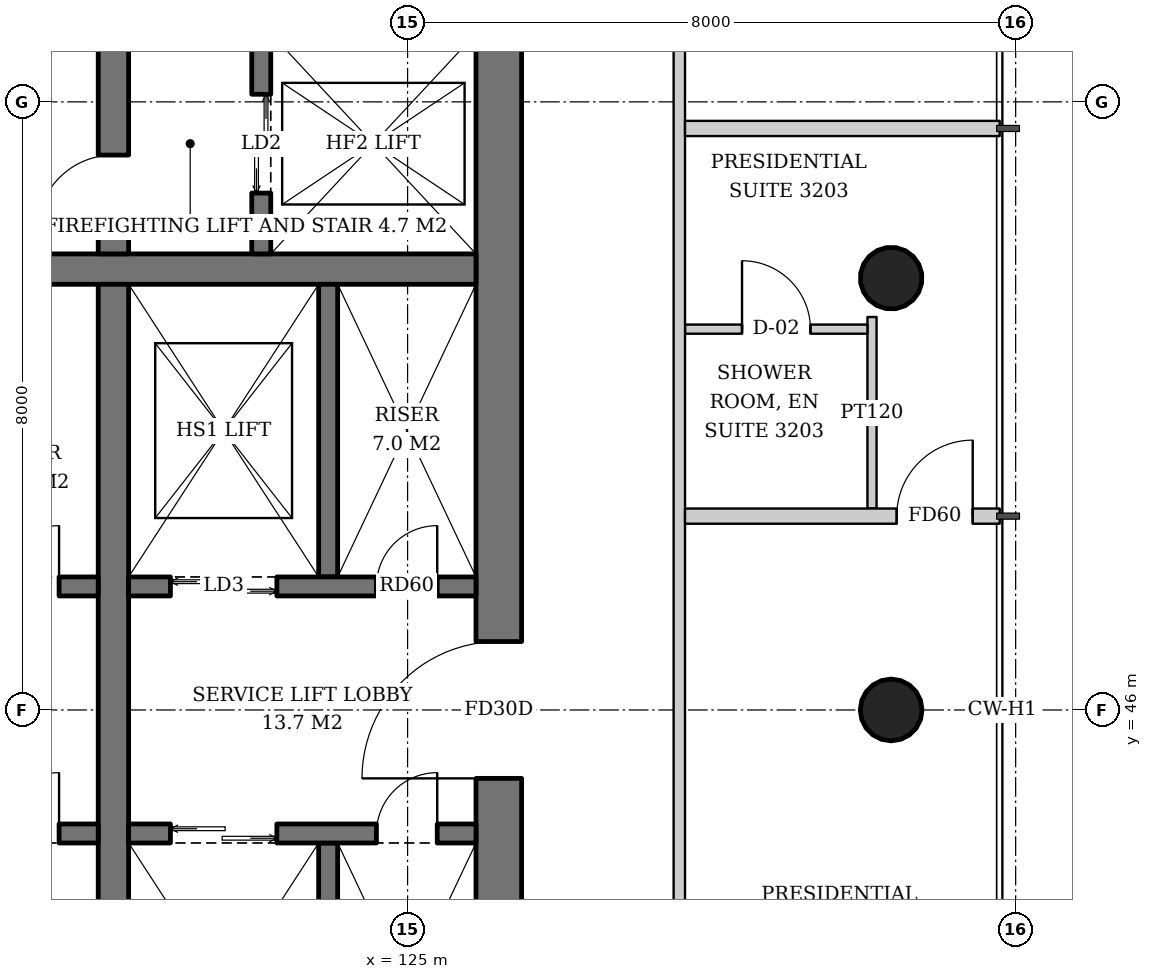
"""IFC4 building model, lengths in metres.
Left out: names, types, materials, properties, quantities, classifications, styles, units other than length and angle.
Written with IfcOpenShell. Run it as: python <this file> out.ifc"""

import sys

from ifc_helpers import new_model, si_unit, direction, frame, frame_2d, origin, origin_2d, place, context, subcontext, project, spatial, rectangle, hollow_circle, extrude, element, fill, save


model = new_model("IFC4")
c1 = context("Model", 3, precision=1e-05, world=origin(), true_north=direction((0.0, 1.0)))
c2 = subcontext(c1, "Body", "Model", "MODEL_VIEW")
j1 = project(units=[si_unit("LENGTHUNIT", "METRE"), si_unit("PLANEANGLEUNIT", "RADIAN")], contexts=[c1])
p1 = place(None, origin())
s1 = spatial("IfcSite", under=j1, at=p1, CompositionType="ELEMENT")
p2 = place(p1, origin())
s2 = spatial("IfcBuilding", under=s1, at=p2, CompositionType="ELEMENT")
p3 = place(p2, frame((0.0, 0.0, 127.4)))
s3 = spatial("IfcBuildingStorey", under=s2, at=p3, CompositionType="ELEMENT", Elevation=127.4)
p4 = place(p3, frame((131.414, 46.0, 0.0), z_axis=(-0.043069538298, 0.0, 0.999072076915), x_axis=(0.0, -1.0, 0.0)))
e1 = element("IfcColumn", 1, at=p4, inside=s3, PredefinedType="COLUMN", context=c2, shape_type="SweptSolid", body=[
    extrude(hollow_circle(Radius=0.406, WallThickness=0.03, at=origin_2d()), origin(), (0.0, 0.0, 1.0), 3.803),
])
p5 = place(p3, frame((131.414, 51.707, 0.0), z_axis=(-0.043059584825, -0.021497706284, 0.998841188968), x_axis=(0.446680166538, -0.894693706707, 0.0)))
e2 = element("IfcColumn", 2, at=p5, inside=s3, PredefinedType="COLUMN", context=c2, shape_type="SweptSolid", body=[
    extrude(hollow_circle(Radius=0.406, WallThickness=0.03, at=origin_2d()), origin(), (0.0, 0.0, 1.0), 3.804),
])
p6 = place(p3, frame((126.2, 37.1, 0.0), z_axis=(0.0, 0.0, 1.0), x_axis=(0.0, 1.0, 0.0)))
e3 = element("IfcWall", 3, at=p6, inside=s3, PredefinedType="SHEAR", context=c2, shape_type="SweptSolid", body=[
    extrude(rectangle(XDim=17.8, YDim=0.6, at=frame_2d((8.9, 0.0))), origin(), (0.0, 0.0, 1.0), 3.8),
])
p7 = place(p6, frame((8.0, 0.0, 0.0)))
e4 = element("IfcOpeningElement", 4, at=p7, cuts=e3, PredefinedType="OPENING", context=c2, shape_type="SweptSolid", body=[
    extrude(rectangle(XDim=1.8, YDim=2.4, at=frame_2d((0.9, 1.2))), frame((0.0, 0.31, 0.0), z_axis=(0.0, -1.0, 0.0), x_axis=(1.0, 0.0, 0.0)), (0.0, 0.0, 1.0), 0.62),
])
p8 = place(p3, frame((108.1, 51.8, 0.0), z_axis=(0.0, 0.0, 1.0), x_axis=(1.0, 0.0, 0.0)))
e5 = element("IfcWall", 5, at=p8, inside=s3, PredefinedType="SHEAR", context=c2, shape_type="SweptSolid", body=[
    extrude(rectangle(XDim=17.8, YDim=0.4, at=frame_2d((8.9, 0.0))), origin(), (0.0, 0.0, 1.0), 3.8),
])
p9 = place(p3, frame((121.13, 40.4, 0.0), z_axis=(0.0, 0.0, 1.0), x_axis=(0.0, 1.0, 0.0)))
e6 = element("IfcWall", 6, at=p9, inside=s3, PredefinedType="SHEAR", context=c2, shape_type="SweptSolid", body=[
    extrude(rectangle(XDim=11.2, YDim=0.4, at=frame_2d((5.6, 0.0))), origin(), (0.0, 0.0, 1.0), 3.8),
])
p10 = place(p3, frame((121.13, 52.0, 0.0), z_axis=(0.0, 0.0, 1.0), x_axis=(0.0, 1.0, 0.0)))
e7 = element("IfcWall", 7, at=p10, inside=s3, PredefinedType="SHEAR", context=c2, shape_type="SweptSolid", body=[
    extrude(rectangle(XDim=2.9, YDim=0.4, at=frame_2d((1.45, 0.0))), origin(), (0.0, 0.0, 1.0), 3.8),
])
p11 = place(p10, frame((0.3, 0.0, 0.0)))
e8 = element("IfcOpeningElement", 8, at=p11, cuts=e7, PredefinedType="OPENING", context=c2, shape_type="SweptSolid", body=[
    extrude(rectangle(XDim=1.0, YDim=2.1, at=frame_2d((0.5, 1.05))), frame((0.0, 0.21, 0.0), z_axis=(0.0, -1.0, 0.0), x_axis=(1.0, 0.0, 0.0)), (0.0, 0.0, 1.0), 0.42),
])
p12 = place(p3, frame((123.075, 52.0, 0.0), z_axis=(0.0, 0.0, 1.0), x_axis=(0.0, 1.0, 0.0)))
e9 = element("IfcWall", 9, at=p12, inside=s3, PredefinedType="SHEAR", context=c2, shape_type="SweptSolid", body=[
    extrude(rectangle(XDim=2.9, YDim=0.25, at=frame_2d((1.45, 0.0))), origin(), (0.0, 0.0, 1.0), 3.8),
])
p13 = place(p12, frame((0.8, 0.0, 0.0)))
e10 = element("IfcOpeningElement", 10, at=p13, cuts=e9, PredefinedType="OPENING", context=c2, shape_type="SweptSolid", body=[
    extrude(rectangle(XDim=1.3, YDim=2.2, at=frame_2d((0.65, 1.1))), frame((0.0, 0.135, 0.0), z_axis=(0.0, -1.0, 0.0), x_axis=(1.0, 0.0, 0.0)), (0.0, 0.0, 1.0), 0.27),
])
p14 = place(p3, frame((108.1, 47.625, 0.0), z_axis=(0.0, 0.0, 1.0), x_axis=(1.0, 0.0, 0.0)))
e11 = element("IfcWall", 11, at=p14, inside=s3, PredefinedType="SHEAR", context=c2, shape_type="SweptSolid", body=[
    extrude(rectangle(XDim=12.83, YDim=0.25, at=frame_2d((6.415, 0.0))), origin(), (0.0, 0.0, 1.0), 3.8),
])
p15 = place(p14, frame((0.7, 0.0, 0.0)))
e12 = element("IfcOpeningElement", 12, at=p15, cuts=e11, PredefinedType="OPENING", context=c2, shape_type="SweptSolid", body=[
    extrude(rectangle(XDim=1.1, YDim=2.2, at=frame_2d((0.55, 1.1))), frame((0.0, 0.135, 0.0), z_axis=(0.0, -1.0, 0.0), x_axis=(1.0, 0.0, 0.0)), (0.0, 0.0, 1.0), 0.27),
])
p16 = place(p14, frame((3.45, 0.0, 0.0)))
e13 = element("IfcOpeningElement", 13, at=p16, cuts=e11, PredefinedType="OPENING", context=c2, shape_type="SweptSolid", body=[
    extrude(rectangle(XDim=1.1, YDim=2.2, at=frame_2d((0.55, 1.1))), frame((0.0, 0.135, 0.0), z_axis=(0.0, -1.0, 0.0), x_axis=(1.0, 0.0, 0.0)), (0.0, 0.0, 1.0), 0.27),
])
p17 = place(p14, frame((6.2, 0.0, 0.0)))
e14 = element("IfcOpeningElement", 14, at=p17, cuts=e11, PredefinedType="OPENING", context=c2, shape_type="SweptSolid", body=[
    extrude(rectangle(XDim=1.1, YDim=2.2, at=frame_2d((0.55, 1.1))), frame((0.0, 0.135, 0.0), z_axis=(0.0, -1.0, 0.0), x_axis=(1.0, 0.0, 0.0)), (0.0, 0.0, 1.0), 0.27),
])
p18 = place(p14, frame((8.95, 0.0, 0.0)))
e15 = element("IfcOpeningElement", 15, at=p18, cuts=e11, PredefinedType="OPENING", context=c2, shape_type="SweptSolid", body=[
    extrude(rectangle(XDim=1.1, YDim=2.2, at=frame_2d((0.55, 1.1))), frame((0.0, 0.135, 0.0), z_axis=(0.0, -1.0, 0.0), x_axis=(1.0, 0.0, 0.0)), (0.0, 0.0, 1.0), 0.27),
])
p19 = place(p14, frame((11.515, 0.0, 0.0)))
e16 = element("IfcOpeningElement", 16, at=p19, cuts=e11, PredefinedType="OPENING", context=c2, shape_type="SweptSolid", body=[
    extrude(rectangle(XDim=0.8, YDim=2.0, at=frame_2d((0.4, 1.0))), frame((0.0, 0.135, 0.0), z_axis=(0.0, -1.0, 0.0), x_axis=(1.0, 0.0, 0.0)), (0.0, 0.0, 1.0), 0.27),
])
p20 = place(p3, frame((108.1, 44.375, 0.0), z_axis=(0.0, 0.0, 1.0), x_axis=(1.0, 0.0, 0.0)))
e17 = element("IfcWall", 17, at=p20, inside=s3, PredefinedType="SHEAR", context=c2, shape_type="SweptSolid", body=[
    extrude(rectangle(XDim=12.83, YDim=0.25, at=frame_2d((6.415, 0.0))), origin(), (0.0, 0.0, 1.0), 3.8),
])
p21 = place(p20, frame((0.7, 0.0, 0.0)))
e18 = element("IfcOpeningElement", 18, at=p21, cuts=e17, PredefinedType="OPENING", context=c2, shape_type="SweptSolid", body=[
    extrude(rectangle(XDim=1.1, YDim=2.2, at=frame_2d((0.55, 1.1))), frame((0.0, 0.135, 0.0), z_axis=(0.0, -1.0, 0.0), x_axis=(1.0, 0.0, 0.0)), (0.0, 0.0, 1.0), 0.27),
])
p22 = place(p20, frame((3.45, 0.0, 0.0)))
e19 = element("IfcOpeningElement", 19, at=p22, cuts=e17, PredefinedType="OPENING", context=c2, shape_type="SweptSolid", body=[
    extrude(rectangle(XDim=1.1, YDim=2.2, at=frame_2d((0.55, 1.1))), frame((0.0, 0.135, 0.0), z_axis=(0.0, -1.0, 0.0), x_axis=(1.0, 0.0, 0.0)), (0.0, 0.0, 1.0), 0.27),
])
p23 = place(p20, frame((6.2, 0.0, 0.0)))
e20 = element("IfcOpeningElement", 20, at=p23, cuts=e17, PredefinedType="OPENING", context=c2, shape_type="SweptSolid", body=[
    extrude(rectangle(XDim=1.1, YDim=2.2, at=frame_2d((0.55, 1.1))), frame((0.0, 0.135, 0.0), z_axis=(0.0, -1.0, 0.0), x_axis=(1.0, 0.0, 0.0)), (0.0, 0.0, 1.0), 0.27),
])
p24 = place(p20, frame((9.0, 0.0, 0.0)))
e21 = element("IfcOpeningElement", 21, at=p24, cuts=e17, PredefinedType="OPENING", context=c2, shape_type="SweptSolid", body=[
    extrude(rectangle(XDim=1.0, YDim=2.1, at=frame_2d((0.5, 1.05))), frame((0.0, 0.135, 0.0), z_axis=(0.0, -1.0, 0.0), x_axis=(1.0, 0.0, 0.0)), (0.0, 0.0, 1.0), 0.27),
])
p25 = place(p20, frame((11.515, 0.0, 0.0)))
e22 = element("IfcOpeningElement", 22, at=p25, cuts=e17, PredefinedType="OPENING", context=c2, shape_type="SweptSolid", body=[
    extrude(rectangle(XDim=0.8, YDim=2.0, at=frame_2d((0.4, 1.0))), frame((0.0, 0.135, 0.0), z_axis=(0.0, -1.0, 0.0), x_axis=(1.0, 0.0, 0.0)), (0.0, 0.0, 1.0), 0.27),
])
p26 = place(p3, frame((123.955, 47.75, 0.0), z_axis=(0.0, 0.0, 1.0), x_axis=(0.0, 1.0, 0.0)))
e23 = element("IfcWall", 23, at=p26, inside=s3, PredefinedType="SHEAR", context=c2, shape_type="SweptSolid", body=[
    extrude(rectangle(XDim=3.85, YDim=0.25, at=frame_2d((1.925, 0.0))), origin(), (0.0, 0.0, 1.0), 3.8),
])
p27 = place(p3, frame((121.33, 47.625, 0.0), z_axis=(0.0, 0.0, 1.0), x_axis=(1.0, 0.0, 0.0)))
e24 = element("IfcWall", 24, at=p27, inside=s3, PredefinedType="SHEAR", context=c2, shape_type="SweptSolid", body=[
    extrude(rectangle(XDim=4.57, YDim=0.25, at=frame_2d((2.285, 0.0))), origin(), (0.0, 0.0, 1.0), 3.8),
])
p28 = place(p27, frame((0.55, 0.0, 0.0)))
e25 = element("IfcOpeningElement", 25, at=p28, cuts=e24, PredefinedType="OPENING", context=c2, shape_type="SweptSolid", body=[
    extrude(rectangle(XDim=1.4, YDim=2.4, at=frame_2d((0.7, 1.2))), frame((0.0, 0.135, 0.0), z_axis=(0.0, -1.0, 0.0), x_axis=(1.0, 0.0, 0.0)), (0.0, 0.0, 1.0), 0.27),
])
p29 = place(p27, frame((3.26, 0.0, 0.0)))
e26 = element("IfcOpeningElement", 26, at=p29, cuts=e24, PredefinedType="OPENING", context=c2, shape_type="SweptSolid", body=[
    extrude(rectangle(XDim=0.8, YDim=2.0, at=frame_2d((0.4, 1.0))), frame((0.0, 0.135, 0.0), z_axis=(0.0, -1.0, 0.0), x_axis=(1.0, 0.0, 0.0)), (0.0, 0.0, 1.0), 0.27),
])
p30 = place(p3, frame((123.955, 44.25, 0.0), z_axis=(0.0, 0.0, 1.0), x_axis=(0.0, -1.0, 0.0)))
e27 = element("IfcWall", 27, at=p30, inside=s3, PredefinedType="SHEAR", context=c2, shape_type="SweptSolid", body=[
    extrude(rectangle(XDim=3.85, YDim=0.25, at=frame_2d((1.925, 0.0))), origin(), (0.0, 0.0, 1.0), 3.8),
])
p31 = place(p3, frame((121.33, 44.375, 0.0), z_axis=(0.0, 0.0, 1.0), x_axis=(1.0, 0.0, 0.0)))
e28 = element("IfcWall", 28, at=p31, inside=s3, PredefinedType="SHEAR", context=c2, shape_type="SweptSolid", body=[
    extrude(rectangle(XDim=4.57, YDim=0.25, at=frame_2d((2.285, 0.0))), origin(), (0.0, 0.0, 1.0), 3.8),
])
p32 = place(p31, frame((0.55, 0.0, 0.0)))
e29 = element("IfcOpeningElement", 29, at=p32, cuts=e28, PredefinedType="OPENING", context=c2, shape_type="SweptSolid", body=[
    extrude(rectangle(XDim=1.4, YDim=2.4, at=frame_2d((0.7, 1.2))), frame((0.0, 0.135, 0.0), z_axis=(0.0, -1.0, 0.0), x_axis=(1.0, 0.0, 0.0)), (0.0, 0.0, 1.0), 0.27),
])
p33 = place(p31, frame((3.26, 0.0, 0.0)))
e30 = element("IfcOpeningElement", 30, at=p33, cuts=e28, PredefinedType="OPENING", context=c2, shape_type="SweptSolid", body=[
    extrude(rectangle(XDim=0.8, YDim=2.0, at=frame_2d((0.4, 1.0))), frame((0.0, 0.135, 0.0), z_axis=(0.0, -1.0, 0.0), x_axis=(1.0, 0.0, 0.0)), (0.0, 0.0, 1.0), 0.27),
])
p34 = place(p3, frame((131.11, 48.65, 0.0), z_axis=(0.0, 0.0, 1.0), x_axis=(0.0, 1.0, 0.0)))
e31 = element("IfcWall", 31, at=p34, inside=s3, PredefinedType="PARTITIONING", context=c2, shape_type="SweptSolid", body=[
    extrude(rectangle(XDim=2.52, YDim=0.12, at=frame_2d((1.26, 0.0))), origin(), (0.0, 0.0, 1.0), 2.35),
])
p35 = place(p3, frame((128.65, 51.01, 0.0), z_axis=(0.0, 0.0, 1.0), x_axis=(1.0, 0.0, 0.0)))
e32 = element("IfcWall", 32, at=p35, inside=s3, PredefinedType="PARTITIONING", context=c2, shape_type="SweptSolid", body=[
    extrude(rectangle(XDim=2.4, YDim=0.12, at=frame_2d((1.2, 0.0))), origin(), (0.0, 0.0, 1.0), 2.35),
])
p36 = place(p35, frame((0.75, 0.0, 0.0)))
e33 = element("IfcOpeningElement", 33, at=p36, cuts=e32, PredefinedType="OPENING", context=c2, shape_type="SweptSolid", body=[
    extrude(rectangle(XDim=0.9, YDim=2.1, at=frame_2d((0.45, 1.05))), frame((0.0, 0.07, 0.0), z_axis=(0.0, -1.0, 0.0), x_axis=(1.0, 0.0, 0.0)), (0.0, 0.0, 1.0), 0.14),
])
p37 = place(p3, frame((128.575, 35.207, 0.0), z_axis=(0.0, 0.0, 1.0), x_axis=(0.0, 1.0, 0.0)))
e34 = element("IfcWall", 34, at=p37, inside=s3, PredefinedType="PARTITIONING", context=c2, shape_type="SweptSolid", body=[
    extrude(rectangle(XDim=21.586, YDim=0.15, at=frame_2d((10.793, 0.0))), origin(), (0.0, 0.0, 1.0), 2.338),
])
p38 = place(p37, frame((0.718, 0.0, 0.0)))
e35 = element("IfcOpeningElement", 35, at=p38, cuts=e34, PredefinedType="OPENING", context=c2, shape_type="SweptSolid", body=[
    extrude(rectangle(XDim=0.9, YDim=2.1, at=frame_2d((0.45, 1.05))), frame((0.0, 0.085, 0.0), z_axis=(0.0, -1.0, 0.0), x_axis=(1.0, 0.0, 0.0)), (0.0, 0.0, 1.0), 0.17),
])
p39 = place(p37, frame((5.893, 0.0, 0.0)))
e36 = element("IfcOpeningElement", 36, at=p39, cuts=e34, PredefinedType="OPENING", context=c2, shape_type="SweptSolid", body=[
    extrude(rectangle(XDim=0.9, YDim=2.1, at=frame_2d((0.45, 1.05))), frame((0.0, 0.085, 0.0), z_axis=(0.0, -1.0, 0.0), x_axis=(1.0, 0.0, 0.0)), (0.0, 0.0, 1.0), 0.17),
])
p40 = place(p3, frame((128.65, 48.55, 0.0), z_axis=(0.0, 0.0, 1.0), x_axis=(1.0, 0.0, 0.0)))
e37 = element("IfcWall", 37, at=p40, inside=s3, PredefinedType="PARTITIONING", context=c2, shape_type="SweptSolid", body=[
    extrude(rectangle(XDim=4.14, YDim=0.2, at=frame_2d((2.07, 0.0))), origin(), (0.0, 0.0, 1.0), 2.35),
])
p41 = place(p40, frame((2.785, 0.0, 0.0)))
e38 = element("IfcOpeningElement", 38, at=p41, cuts=e37, PredefinedType="OPENING", context=c2, shape_type="SweptSolid", body=[
    extrude(rectangle(XDim=1.0, YDim=2.1, at=frame_2d((0.5, 1.05))), frame((0.0, 0.11, 0.0), z_axis=(0.0, -1.0, 0.0), x_axis=(1.0, 0.0, 0.0)), (0.0, 0.0, 1.0), 0.22),
])
p42 = place(p3, frame((128.65, 53.65, 0.0), z_axis=(0.0, 0.0, 1.0), x_axis=(1.0, 0.0, 0.0)))
e39 = element("IfcWall", 39, at=p42, inside=s3, PredefinedType="PARTITIONING", context=c2, shape_type="SweptSolid", body=[
    extrude(rectangle(XDim=4.14, YDim=0.2, at=frame_2d((2.07, 0.0))), origin(), (0.0, 0.0, 1.0), 2.35),
])
p43 = place(p13, origin())
e40 = element("IfcDoor", 40, at=p43, inside=s3, OperationType="DOUBLE_DOOR_SLIDING", PredefinedType="DOOR", context=c2, shape_type="SweptSolid", body=[
    extrude(rectangle(XDim=1.3, YDim=2.2, at=frame_2d((0.65, 1.1))), frame((0.0, 0.025, 0.0), z_axis=(0.0, -1.0, 0.0), x_axis=(1.0, 0.0, 0.0)), (0.0, 0.0, 1.0), 0.05),
])
fill(e10, e40)
p44 = place(p19, origin())
e41 = element("IfcDoor", 41, at=p44, inside=s3, OperationType="SINGLE_SWING_RIGHT", PredefinedType="DOOR", context=c2, shape_type="SweptSolid", body=[
    extrude(rectangle(XDim=0.8, YDim=2.0, at=frame_2d((0.4, 1.0))), frame((0.0, 0.025, 0.0), z_axis=(0.0, -1.0, 0.0), x_axis=(1.0, 0.0, 0.0)), (0.0, 0.0, 1.0), 0.05),
])
fill(e16, e41)
p45 = place(p25, origin())
e42 = element("IfcDoor", 42, at=p45, inside=s3, OperationType="SINGLE_SWING_RIGHT", PredefinedType="DOOR", context=c2, shape_type="SweptSolid", body=[
    extrude(rectangle(XDim=0.8, YDim=2.0, at=frame_2d((0.4, 1.0))), frame((0.0, 0.025, 0.0), z_axis=(0.0, -1.0, 0.0), x_axis=(1.0, 0.0, 0.0)), (0.0, 0.0, 1.0), 0.05),
])
fill(e22, e42)
p46 = place(p28, origin())
e43 = element("IfcDoor", 43, at=p46, inside=s3, OperationType="DOUBLE_DOOR_SLIDING", PredefinedType="DOOR", context=c2, shape_type="SweptSolid", body=[
    extrude(rectangle(XDim=1.4, YDim=2.4, at=frame_2d((0.7, 1.2))), frame((0.0, 0.025, 0.0), z_axis=(0.0, -1.0, 0.0), x_axis=(1.0, 0.0, 0.0)), (0.0, 0.0, 1.0), 0.05),
])
fill(e25, e43)
p47 = place(p29, origin())
e44 = element("IfcDoor", 44, at=p47, inside=s3, OperationType="SINGLE_SWING_RIGHT", PredefinedType="DOOR", context=c2, shape_type="SweptSolid", body=[
    extrude(rectangle(XDim=0.8, YDim=2.0, at=frame_2d((0.4, 1.0))), frame((0.0, 0.025, 0.0), z_axis=(0.0, -1.0, 0.0), x_axis=(1.0, 0.0, 0.0)), (0.0, 0.0, 1.0), 0.05),
])
fill(e26, e44)
p48 = place(p32, origin())
e45 = element("IfcDoor", 45, at=p48, inside=s3, OperationType="DOUBLE_DOOR_SLIDING", PredefinedType="DOOR", context=c2, shape_type="SweptSolid", body=[
    extrude(rectangle(XDim=1.4, YDim=2.4, at=frame_2d((0.7, 1.2))), frame((0.0, 0.025, 0.0), z_axis=(0.0, -1.0, 0.0), x_axis=(1.0, 0.0, 0.0)), (0.0, 0.0, 1.0), 0.05),
])
fill(e29, e45)
p49 = place(p33, origin())
e46 = element("IfcDoor", 46, at=p49, inside=s3, OperationType="SINGLE_SWING_RIGHT", PredefinedType="DOOR", context=c2, shape_type="SweptSolid", body=[
    extrude(rectangle(XDim=0.8, YDim=2.0, at=frame_2d((0.4, 1.0))), frame((0.0, 0.025, 0.0), z_axis=(0.0, -1.0, 0.0), x_axis=(1.0, 0.0, 0.0)), (0.0, 0.0, 1.0), 0.05),
])
fill(e30, e46)
p50 = place(p11, origin())
e47 = element("IfcDoor", 47, at=p50, inside=s3, OperationType="SINGLE_SWING_LEFT", PredefinedType="DOOR", context=c2, shape_type="SweptSolid", body=[
    extrude(rectangle(XDim=1.0, YDim=2.1, at=frame_2d((0.5, 1.05))), frame((0.0, 0.025, 0.0), z_axis=(0.0, -1.0, 0.0), x_axis=(1.0, 0.0, 0.0)), (0.0, 0.0, 1.0), 0.05),
])
fill(e8, e47)
p51 = place(p7, origin())
e48 = element("IfcDoor", 48, at=p51, inside=s3, OperationType="DOUBLE_DOOR_SINGLE_SWING", PredefinedType="DOOR", context=c2, shape_type="SweptSolid", body=[
    extrude(rectangle(XDim=1.8, YDim=2.4, at=frame_2d((0.9, 1.2))), frame((0.0, 0.025, 0.0), z_axis=(0.0, -1.0, 0.0), x_axis=(1.0, 0.0, 0.0)), (0.0, 0.0, 1.0), 0.05),
])
fill(e4, e48)
p52 = place(p36, origin())
e49 = element("IfcDoor", 49, at=p52, inside=s3, OperationType="SINGLE_SWING_LEFT", PredefinedType="DOOR", context=c2, shape_type="SweptSolid", body=[
    extrude(rectangle(XDim=0.9, YDim=2.1, at=frame_2d((0.45, 1.05))), frame((0.0, 0.025, 0.0), z_axis=(0.0, -1.0, 0.0), x_axis=(1.0, 0.0, 0.0)), (0.0, 0.0, 1.0), 0.05),
])
fill(e33, e49)
p53 = place(p41, origin())
e50 = element("IfcDoor", 50, at=p53, inside=s3, OperationType="SINGLE_SWING_RIGHT", PredefinedType="DOOR", context=c2, shape_type="SweptSolid", body=[
    extrude(rectangle(XDim=1.0, YDim=2.1, at=frame_2d((0.5, 1.05))), frame((0.0, 0.025, 0.0), z_axis=(0.0, -1.0, 0.0), x_axis=(1.0, 0.0, 0.0)), (0.0, 0.0, 1.0), 0.05),
])
fill(e38, e50)
save(model, sys.argv[1])
